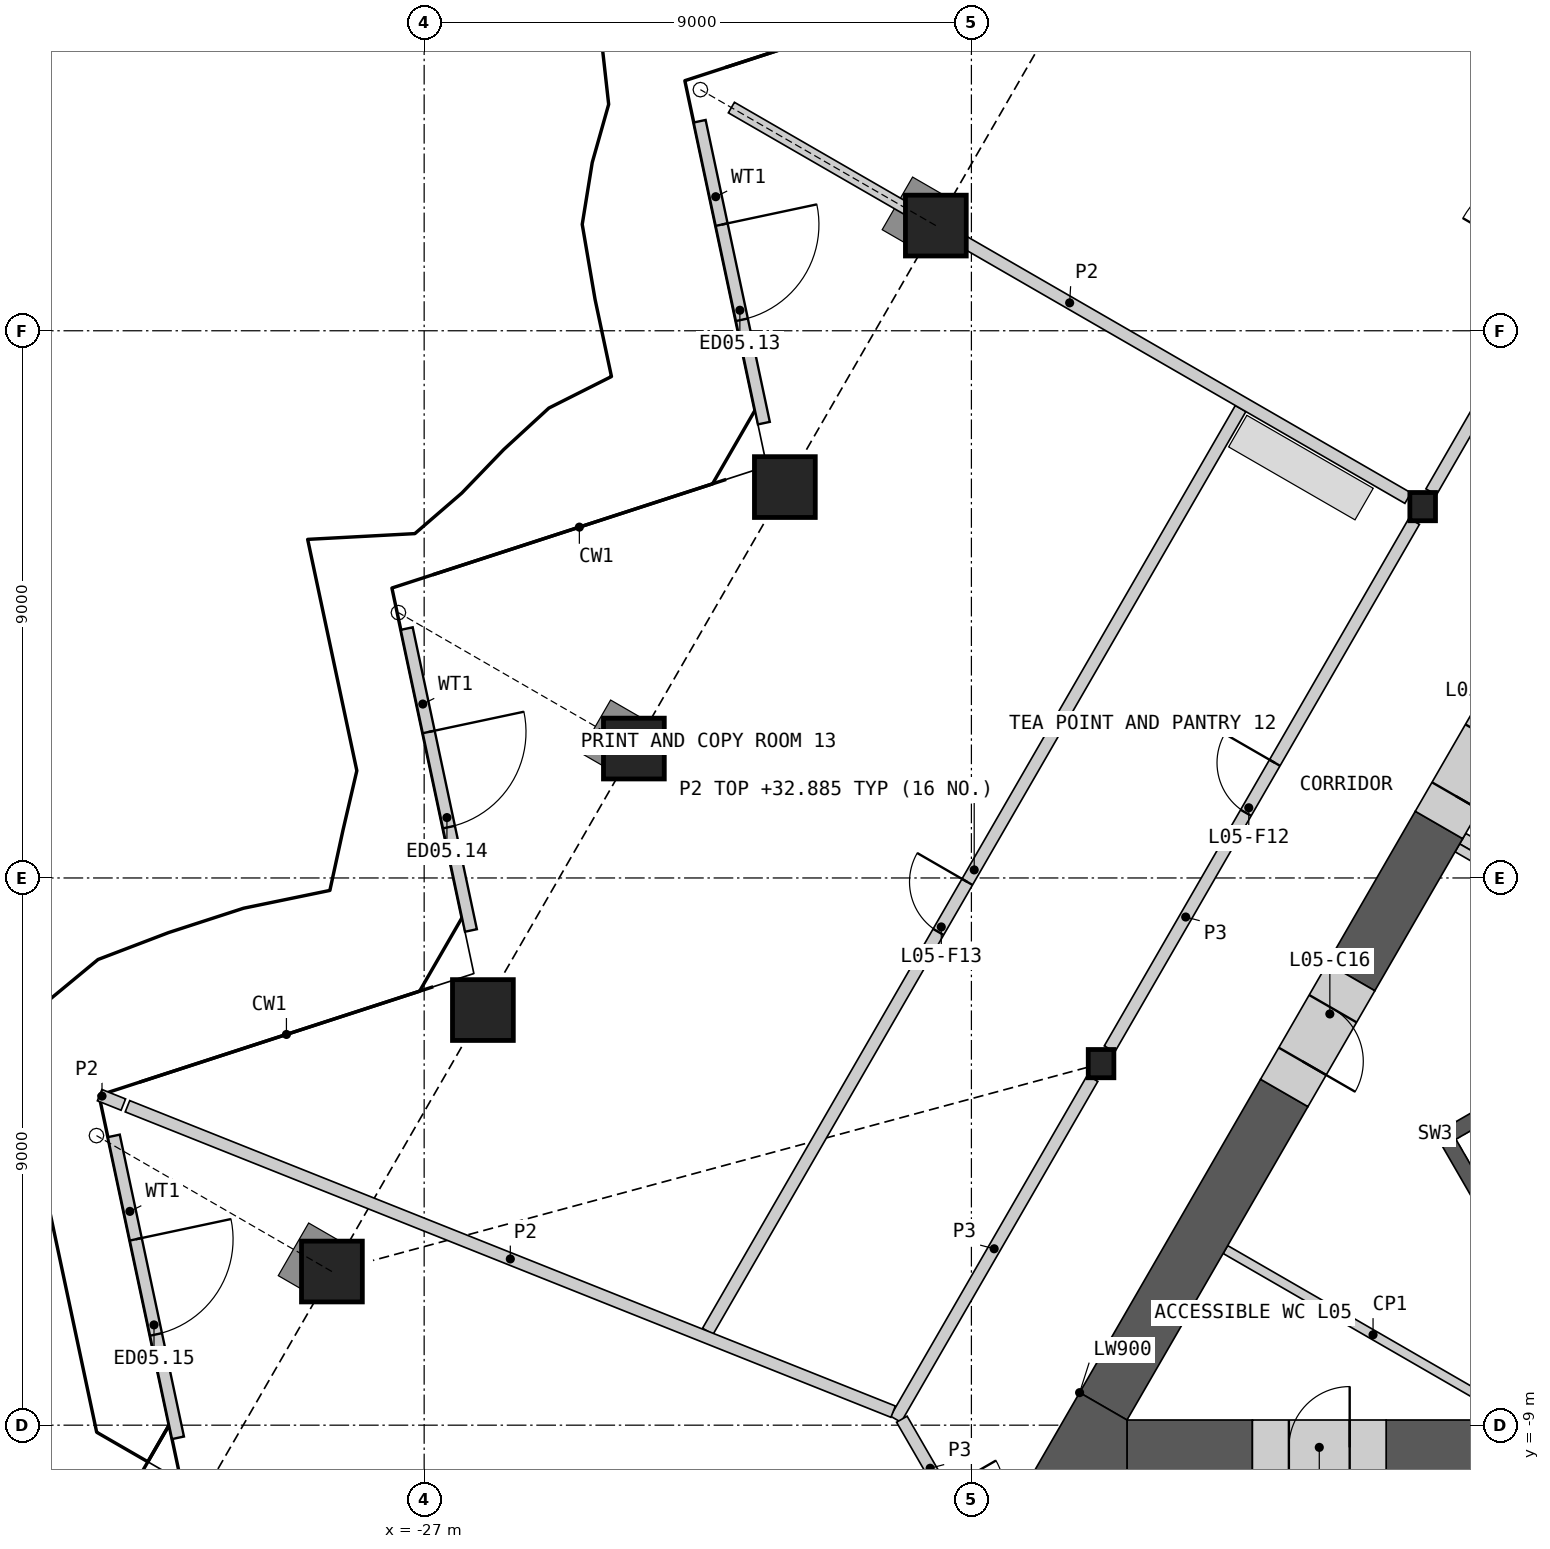
"""IFC4 building model, lengths in metres.
Left out: names, types, materials, properties, quantities, classifications, styles, units other than length and angle.
Written with IfcOpenShell. Run it as: python <this file> out.ifc"""

import sys

from ifc_helpers import new_model, si_unit, direction, frame, frame_2d, origin, origin_2d, place, context, subcontext, project, spatial, polyline, rectangle, hollow_rectangle, i_section, outline, extrude, element, fill, save


model = new_model("IFC4")
c1 = context("Model", 3, precision=1e-05, world=origin(), true_north=direction((0.0, 1.0)))
c2 = subcontext(c1, "Body", "Model", "MODEL_VIEW")
j1 = project(units=[si_unit("LENGTHUNIT", "METRE"), si_unit("PLANEANGLEUNIT", "RADIAN")], contexts=[c1])
p1 = place(None, origin())
s1 = spatial("IfcSite", under=j1, at=p1, CompositionType="ELEMENT")
p2 = place(p1, origin())
s2 = spatial("IfcBuilding", under=s1, at=p2, CompositionType="ELEMENT")
p3 = place(p2, frame((0.0, 0.0, 30.0)))
s3 = spatial("IfcBuildingStorey", under=s2, at=p3, CompositionType="ELEMENT", Elevation=30.0)
p4 = place(p3, frame((-18.585, 10.73, 0.0), z_axis=(-0.631257748816, 0.364419821328, 0.684625334313), x_axis=(-0.499961918033, -0.866047389302, 0.0)))
e1 = element("IfcColumn", 1, at=p4, inside=s3, PredefinedType="COLUMN", context=c2, shape_type="SweptSolid", body=[
    extrude(hollow_rectangle(XDim=1.0, YDim=1.0, WallThickness=0.07, at=origin_2d()), frame((0.0, 0.0, 0.532)), (0.0, 0.0, 1.0), 5.07),
])
p5 = place(p3, frame((-21.068, 6.429, 0.0), z_axis=(0.0, 0.0, 1.0), x_axis=(1.0, 0.0, 0.0)))
e2 = element("IfcColumn", 2, at=p5, inside=s3, PredefinedType="COLUMN", context=c2, shape_type="SweptSolid", body=[
    extrude(hollow_rectangle(XDim=1.0, YDim=1.0, WallThickness=0.07, at=origin_2d()), origin(), (0.0, 0.0, 1.0), 4.2),
])
p6 = place(p3, frame((-23.551, 2.128, 0.0), z_axis=(-0.631248593533, 0.36445433234, 0.684615405028), x_axis=(-0.500002867593, -0.866023748172, 0.0)))
e3 = element("IfcColumn", 3, at=p6, inside=s3, PredefinedType="COLUMN", context=c2, shape_type="SweptSolid", body=[
    extrude(hollow_rectangle(XDim=1.0, YDim=1.0, WallThickness=0.07, at=origin_2d()), frame((0.0, 0.0, 0.532)), (0.0, 0.0, 1.0), 5.07),
])
p7 = place(p3, frame((-26.034, -2.172, 0.0), z_axis=(0.0, 0.0, 1.0), x_axis=(1.0, 0.0, 0.0)))
e4 = element("IfcColumn", 4, at=p7, inside=s3, PredefinedType="COLUMN", context=c2, shape_type="SweptSolid", body=[
    extrude(hollow_rectangle(XDim=1.0, YDim=1.0, WallThickness=0.07, at=origin_2d()), origin(), (0.0, 0.0, 1.0), 4.2),
])
p8 = place(p3, frame((-28.517, -6.473, 0.0), z_axis=(-0.631257748816, 0.364419821328, 0.684625334313), x_axis=(-0.499961918033, -0.866047389302, 0.0)))
e5 = element("IfcColumn", 5, at=p8, inside=s3, PredefinedType="COLUMN", context=c2, shape_type="SweptSolid", body=[
    extrude(hollow_rectangle(XDim=1.0, YDim=1.0, WallThickness=0.07, at=origin_2d()), frame((0.0, 0.0, 0.532)), (0.0, 0.0, 1.0), 5.07),
])
for number, where, z_axis, x_axis in (
    (6, (-10.578, 6.107, 0.0), (0.0, 0.0, 1.0), (1.0, 0.0, 0.0)),
    (7, (-15.868, -3.054, 0.0), (0.0, 0.0, 1.0), (1.0, 0.0, 0.0)),
):
    element("IfcColumn", number, at=place(p3, frame(where, z_axis=z_axis, x_axis=x_axis)), inside=s3, PredefinedType="COLUMN", context=c2, shape_type="SweptSolid", body=[
        extrude(i_section(OverallWidth=0.421, OverallDepth=0.465, WebThickness=0.045, FlangeThickness=0.072, at=origin_2d()), origin(), (0.0, 0.0, 1.0), 4.2),
    ])
p9 = place(p3, frame((-22.469, 12.446, 0.0), z_axis=(0.0, 0.0, 1.0), x_axis=(0.207903044531, -0.978149438519, 0.0)))
e8 = element("IfcWall", 8, at=p9, inside=s3, PredefinedType="SOLIDWALL", context=c2, shape_type="SweptSolid", body=[
    extrude(rectangle(XDim=5.076, YDim=0.2, at=frame_2d((2.538, 0.0))), origin(), (0.0, 0.0, 1.0), 3.189),
])
p10 = place(p9, frame((1.738, 0.0, 0.0)))
e9 = element("IfcOpeningElement", 9, at=p10, cuts=e8, PredefinedType="OPENING", context=c2, shape_type="SweptSolid", body=[
    extrude(rectangle(XDim=1.6, YDim=2.4, at=frame_2d((0.8, 1.2))), frame((0.0, 0.11, 0.0), z_axis=(0.0, -1.0, 0.0), x_axis=(1.0, 0.0, 0.0)), (0.0, 0.0, 1.0), 0.22),
])
p11 = place(p3, frame((-27.286, 4.102, 0.0), z_axis=(0.0, 0.0, 1.0), x_axis=(0.207949057422, -0.978139657471, 0.0)))
e10 = element("IfcWall", 10, at=p11, inside=s3, PredefinedType="SOLIDWALL", context=c2, shape_type="SweptSolid", body=[
    extrude(rectangle(XDim=5.077, YDim=0.2, at=frame_2d((2.538, 0.0))), origin(), (0.0, 0.0, 1.0), 3.189),
])
p12 = place(p11, frame((1.738, 0.0, 0.0)))
e11 = element("IfcOpeningElement", 11, at=p12, cuts=e10, PredefinedType="OPENING", context=c2, shape_type="SweptSolid", body=[
    extrude(rectangle(XDim=1.6, YDim=2.4, at=frame_2d((0.8, 1.2))), frame((0.0, 0.11, 0.0), z_axis=(0.0, -1.0, 0.0), x_axis=(1.0, 0.0, 0.0)), (0.0, 0.0, 1.0), 0.22),
])
p13 = place(p3, frame((-32.104, -4.242, 0.0), z_axis=(0.0, 0.0, 1.0), x_axis=(0.207903044531, -0.978149438519, 0.0)))
e12 = element("IfcWall", 12, at=p13, inside=s3, PredefinedType="SOLIDWALL", context=c2, shape_type="SweptSolid", body=[
    extrude(rectangle(XDim=5.076, YDim=0.2, at=frame_2d((2.538, 0.0))), origin(), (0.0, 0.0, 1.0), 3.189),
])
p14 = place(p13, frame((1.738, 0.0, 0.0)))
e13 = element("IfcOpeningElement", 13, at=p14, cuts=e12, PredefinedType="OPENING", context=c2, shape_type="SweptSolid", body=[
    extrude(rectangle(XDim=1.6, YDim=2.4, at=frame_2d((0.8, 1.2))), frame((0.0, 0.11, 0.0), z_axis=(0.0, -1.0, 0.0), x_axis=(1.0, 0.0, 0.0)), (0.0, 0.0, 1.0), 0.22),
])
p15 = place(p3, frame((-8.181, -0.357, 0.0), z_axis=(0.0, 0.0, 1.0), x_axis=(-0.866035824272, 0.499981950752, 0.0)))
e14 = element("IfcWall", 14, at=p15, inside=s3, PredefinedType="SHEAR", context=c2, shape_type="SweptSolid", body=[
    extrude(rectangle(XDim=2.009, YDim=0.2, at=frame_2d((1.004, 0.0))), origin(), (0.0, 0.0, 1.0), 3.8),
])
p16 = place(p3, origin())
e15 = element("IfcWall", 15, at=p16, inside=s3, PredefinedType="SHEAR", context=c2, shape_type="SweptSolid", body=[
    extrude(outline(polyline([(-5.307, -1.281), (-10.374, -4.206), (-10.032, -4.298), (-5.182, -1.498), (-5.307, -1.281)])), origin(), (0.0, 0.0, 1.0), 3.8),
])
p17 = place(p3, origin())
e16 = element("IfcWall", 16, at=p17, inside=s3, PredefinedType="SHEAR", context=c2, shape_type="SweptSolid", body=[
    extrude(outline(polyline([(-10.374, -4.206), (-8.83, -6.881), (-8.738, -6.539), (-10.032, -4.298), (-10.374, -4.206)])), origin(), (0.0, 0.0, 1.0), 3.8),
])
p18 = place(p3, frame((-8.268, -0.509, 0.0), z_axis=(0.0, 0.0, 1.0), x_axis=(-0.866035824272, 0.499981950752, 0.0)))
e17 = element("IfcWall", 17, at=p18, inside=s3, PredefinedType="PARTITIONING", context=c2, shape_type="SweptSolid", body=[
    extrude(rectangle(XDim=2.009, YDim=0.15, at=frame_2d((1.004, 0.0))), origin(), (0.0, 0.0, 1.0), 3.8),
])
p19 = place(p3, frame((-13.823, -6.111, 0.0), z_axis=(0.0, 0.0, 1.0), x_axis=(0.866026802741, -0.499997576928, 0.0)))
e18 = element("IfcWall", 18, at=p19, inside=s3, PredefinedType="PARTITIONING", context=c2, shape_type="SweptSolid", body=[
    extrude(rectangle(XDim=5.607, YDim=0.15, at=frame_2d((2.804, 0.0))), origin(), (0.0, 0.0, 1.0), 3.8),
])
p20 = place(p3, frame((-11.179, -9.365, 0.0), z_axis=(0.0, 0.0, 1.0), x_axis=(1.0, 0.0, 0.0)))
e19 = element("IfcWall", 19, at=p20, inside=s3, PredefinedType="SHEAR", context=c2, shape_type="SweptSolid", body=[
    extrude(rectangle(XDim=15.55, YDim=0.9, at=frame_2d((7.775, 0.0))), origin(), (0.0, 0.0, 1.0), 3.8),
])
p21 = place(p3, frame((-15.441, -9.365, 0.0), z_axis=(0.0, 0.0, 1.0), x_axis=(1.0, 0.0, 0.0)))
e20 = element("IfcWall", 20, at=p21, inside=s3, PredefinedType="SHEAR", context=c2, shape_type="SweptSolid", body=[
    extrude(rectangle(XDim=2.062, YDim=0.9, at=frame_2d((1.031, 0.0))), origin(), (0.0, 0.0, 1.0), 3.8),
])
p22 = place(p3, frame((-12.855, -3.536, 0.0), z_axis=(0.0, 0.0, 1.0), x_axis=(-0.499999419053, -0.866025739194, 0.0)))
e21 = element("IfcWall", 21, at=p22, inside=s3, PredefinedType="SHEAR", context=c2, shape_type="SweptSolid", body=[
    extrude(rectangle(XDim=5.952, YDim=0.9, at=frame_2d((2.976, 0.0))), origin(), (0.0, 0.0, 1.0), 3.8),
])
p23 = place(p3, frame((-10.31, 0.872, 0.0), z_axis=(0.0, 0.0, 1.0), x_axis=(-0.499946751862, -0.866056144429, 0.0)))
e22 = element("IfcWall", 22, at=p23, inside=s3, PredefinedType="SHEAR", context=c2, shape_type="SweptSolid", body=[
    extrude(rectangle(XDim=2.889, YDim=0.9, at=frame_2d((1.445, 0.0))), origin(), (0.0, 0.0, 1.0), 3.8),
])
p24 = place(p3, origin())
e23 = element("IfcWall", 23, at=p24, inside=s3, PredefinedType="SHEAR", context=c2, shape_type="SweptSolid", body=[
    extrude(outline(polyline([(-16.221, -8.465), (-15.441, -8.915), (-15.441, -9.815), (-17.0, -9.815), (-16.221, -8.465)])), origin(), (0.0, 0.0, 1.0), 3.8),
])
p25 = place(p3, frame((-13.379, -9.365, 0.0), z_axis=(0.0, 0.0, 1.0), x_axis=(1.0, 0.0, 0.0)))
e24 = element("IfcWall", 24, at=p25, inside=s3, PredefinedType="SHEAR", context=c2, shape_type="SweptSolid", body=[
    extrude(rectangle(XDim=2.2, YDim=0.9, at=frame_2d((1.1, 0.0))), origin(), (0.0, 0.0, 1.0), 3.8),
])
p26 = place(p25, frame((0.6, 0.0, 0.0)))
e25 = element("IfcOpeningElement", 25, at=p26, cuts=e24, PredefinedType="OPENING", context=c2, shape_type="SweptSolid", body=[
    extrude(rectangle(XDim=1.0, YDim=2.1, at=frame_2d((0.5, 1.05))), frame((0.0, 0.46, 0.0), z_axis=(0.0, -1.0, 0.0), x_axis=(1.0, 0.0, 0.0)), (0.0, 0.0, 1.0), 0.92),
])
p27 = place(p3, frame((-11.755, -1.63, 0.0), z_axis=(0.0, 0.0, 1.0), x_axis=(-0.50002983664, -0.866008176907, 0.0)))
e26 = element("IfcWall", 26, at=p27, inside=s3, PredefinedType="SHEAR", context=c2, shape_type="SweptSolid", body=[
    extrude(rectangle(XDim=2.2, YDim=0.9, at=frame_2d((1.1, 0.0))), origin(), (0.0, 0.0, 1.0), 3.8),
])
p28 = place(p27, frame((0.6, 0.0, 0.0)))
e27 = element("IfcOpeningElement", 27, at=p28, cuts=e26, PredefinedType="OPENING", context=c2, shape_type="SweptSolid", body=[
    extrude(rectangle(XDim=1.0, YDim=2.1, at=frame_2d((0.5, 1.05))), frame((0.0, 0.46, 0.0), z_axis=(0.0, -1.0, 0.0), x_axis=(1.0, 0.0, 0.0)), (0.0, 0.0, 1.0), 0.92),
])
p29 = place(p3, frame((-9.21, 2.777, 0.0), z_axis=(0.0, 0.0, 1.0), x_axis=(-0.500077893725, -0.86598042715, 0.0)))
e28 = element("IfcWall", 28, at=p29, inside=s3, PredefinedType="SHEAR", context=c2, shape_type="SweptSolid", body=[
    extrude(rectangle(XDim=2.2, YDim=0.9, at=frame_2d((1.1, 0.0))), origin(), (0.0, 0.0, 1.0), 3.8),
])
p30 = place(p29, frame((0.55, 0.0, 0.0)))
e29 = element("IfcOpeningElement", 29, at=p30, cuts=e28, PredefinedType="OPENING", context=c2, shape_type="SweptSolid", body=[
    extrude(rectangle(XDim=1.1, YDim=2.1, at=frame_2d((0.55, 1.05))), frame((0.0, 0.46, 0.0), z_axis=(0.0, -1.0, 0.0), x_axis=(1.0, 0.0, 0.0)), (0.0, 0.0, 1.0), 0.92),
])
p31 = place(p3, frame((-10.439, 6.35, 0.0), z_axis=(0.0, 0.0, 1.0), x_axis=(0.50001002959, 0.86601961312, 0.0)))
e30 = element("IfcWall", 30, at=p31, inside=s3, PredefinedType="PARTITIONING", context=c2, shape_type="SweptSolid", body=[
    extrude(rectangle(XDim=10.019, YDim=0.2, at=frame_2d((5.009, 0.0))), origin(), (0.0, 0.0, 1.0), 3.8),
])
p32 = place(p31, frame((4.16, 0.0, 0.0)))
e31 = element("IfcOpeningElement", 31, at=p32, cuts=e30, PredefinedType="OPENING", context=c2, shape_type="SweptSolid", body=[
    extrude(rectangle(XDim=1.8, YDim=2.1, at=frame_2d((0.9, 1.05))), frame((0.0, 0.11, 0.0), z_axis=(0.0, -1.0, 0.0), x_axis=(1.0, 0.0, 0.0)), (0.0, 0.0, 1.0), 0.22),
])
p33 = place(p3, frame((-15.728, -2.811, 0.0), z_axis=(0.0, 0.0, 1.0), x_axis=(0.49999175339, 0.866030164915, 0.0)))
e32 = element("IfcWall", 32, at=p33, inside=s3, PredefinedType="PARTITIONING", context=c2, shape_type="SweptSolid", body=[
    extrude(rectangle(XDim=10.019, YDim=0.2, at=frame_2d((5.009, 0.0))), origin(), (0.0, 0.0, 1.0), 3.8),
])
p34 = place(p33, frame((4.484, 0.0, 0.0)))
e33 = element("IfcOpeningElement", 33, at=p34, cuts=e32, PredefinedType="OPENING", context=c2, shape_type="SweptSolid", body=[
    extrude(rectangle(XDim=0.95, YDim=2.1, at=frame_2d((0.475, 1.05))), frame((0.0, 0.11, 0.0), z_axis=(0.0, -1.0, 0.0), x_axis=(1.0, 0.0, 0.0)), (0.0, 0.0, 1.0), 0.22),
])
p35 = place(p3, frame((-19.244, -8.902, 0.0), z_axis=(0.0, 0.0, 1.0), x_axis=(0.499984737558, 0.86603421538, 0.0)))
e34 = element("IfcWall", 34, at=p35, inside=s3, PredefinedType="PARTITIONING", context=c2, shape_type="SweptSolid", body=[
    extrude(rectangle(XDim=6.473, YDim=0.2, at=frame_2d((3.236, 0.0))), origin(), (0.0, 0.0, 1.0), 3.8),
])
p36 = place(p3, frame((-19.144, -8.902, 0.0), z_axis=(0.0, 0.0, 1.0), x_axis=(0.499958791762, -0.866049194065, 0.0)))
e35 = element("IfcWall", 35, at=p36, inside=s3, PredefinedType="PARTITIONING", context=c2, shape_type="SweptSolid", body=[
    extrude(rectangle(XDim=3.726, YDim=0.2, at=frame_2d((1.863, 0.0))), origin(), (0.0, 0.0, 1.0), 3.8),
])
p37 = place(p36, frame((1.363, 0.0, 0.0)))
e36 = element("IfcOpeningElement", 36, at=p37, cuts=e35, PredefinedType="OPENING", context=c2, shape_type="SweptSolid", body=[
    extrude(rectangle(XDim=1.0, YDim=2.1, at=frame_2d((0.5, 1.05))), frame((0.0, 0.11, 0.0), z_axis=(0.0, -1.0, 0.0), x_axis=(1.0, 0.0, 0.0)), (0.0, 0.0, 1.0), 0.22),
])
p38 = place(p3, frame((-22.335, -7.455, 0.0), z_axis=(0.0, 0.0, 1.0), x_axis=(0.499997414609, 0.866026896456, 0.0)))
e37 = element("IfcWall", 37, at=p38, inside=s3, PredefinedType="PARTITIONING", context=c2, shape_type="SweptSolid", body=[
    extrude(rectangle(XDim=17.524, YDim=0.2, at=frame_2d((8.762, 0.0))), origin(), (0.0, 0.0, 1.0), 2.885),
])
p39 = place(p38, frame((7.584, 0.0, 0.0)))
e38 = element("IfcOpeningElement", 38, at=p39, cuts=e37, PredefinedType="OPENING", context=c2, shape_type="SweptSolid", body=[
    extrude(rectangle(XDim=0.95, YDim=2.1, at=frame_2d((0.475, 1.05))), frame((0.0, 0.11, 0.0), z_axis=(0.0, -1.0, 0.0), x_axis=(1.0, 0.0, 0.0)), (0.0, 0.0, 1.0), 0.22),
])
p40 = place(p3, frame((-31.879, -3.754, 0.0), z_axis=(0.0, 0.0, 1.0), x_axis=(0.928821541656, -0.370527385973, 0.0)))
e39 = element("IfcWall", 39, at=p40, inside=s3, PredefinedType="PARTITIONING", context=c2, shape_type="SweptSolid", body=[
    extrude(rectangle(XDim=13.558, YDim=0.2, at=frame_2d((6.779, 0.0))), origin(), (0.0, 0.0, 1.0), 2.885),
])
p41 = place(p3, frame((-21.947, 12.671, 0.0), z_axis=(0.0, 0.0, 1.0), x_axis=(0.866026729935, -0.499997703033, 0.0)))
e40 = element("IfcWall", 40, at=p41, inside=s3, PredefinedType="PARTITIONING", context=c2, shape_type="SweptSolid", body=[
    extrude(rectangle(XDim=12.848, YDim=0.2, at=frame_2d((6.424, 0.0))), origin(), (0.0, 0.0, 1.0), 2.885),
])
p42 = place(p3, frame((-32.337, -3.572, 0.0), z_axis=(0.0, 0.0, 1.0), x_axis=(0.928757356094, -0.370688243003, 0.0)))
e41 = element("IfcWall", 41, at=p42, inside=s3, PredefinedType="PARTITIONING", context=c2, shape_type="SweptSolid", body=[
    extrude(rectangle(XDim=0.419, YDim=0.2, at=frame_2d((0.21, 0.0))), origin(), (0.0, 0.0, 1.0), 2.885),
])
p43 = place(p10, origin())
e42 = element("IfcDoor", 42, at=p43, inside=s3, OperationType="DOUBLE_DOOR_SINGLE_SWING", PredefinedType="DOOR", context=c2, shape_type="SweptSolid", body=[
    extrude(rectangle(XDim=1.6, YDim=2.4, at=frame_2d((0.8, 1.2))), frame((0.0, 0.025, 0.0), z_axis=(0.0, -1.0, 0.0), x_axis=(1.0, 0.0, 0.0)), (0.0, 0.0, 1.0), 0.05),
])
fill(e9, e42)
p44 = place(p12, origin())
e43 = element("IfcDoor", 43, at=p44, inside=s3, OperationType="DOUBLE_DOOR_SINGLE_SWING", PredefinedType="DOOR", context=c2, shape_type="SweptSolid", body=[
    extrude(rectangle(XDim=1.6, YDim=2.4, at=frame_2d((0.8, 1.2))), frame((0.0, 0.025, 0.0), z_axis=(0.0, -1.0, 0.0), x_axis=(1.0, 0.0, 0.0)), (0.0, 0.0, 1.0), 0.05),
])
fill(e11, e43)
p45 = place(p14, origin())
e44 = element("IfcDoor", 44, at=p45, inside=s3, OperationType="DOUBLE_DOOR_SINGLE_SWING", PredefinedType="DOOR", context=c2, shape_type="SweptSolid", body=[
    extrude(rectangle(XDim=1.6, YDim=2.4, at=frame_2d((0.8, 1.2))), frame((0.0, 0.025, 0.0), z_axis=(0.0, -1.0, 0.0), x_axis=(1.0, 0.0, 0.0)), (0.0, 0.0, 1.0), 0.05),
])
fill(e13, e44)
p46 = place(p26, origin())
e45 = element("IfcDoor", 45, at=p46, inside=s3, OperationType="SINGLE_SWING_RIGHT", PredefinedType="DOOR", context=c2, shape_type="SweptSolid", body=[
    extrude(rectangle(XDim=1.0, YDim=2.1, at=frame_2d((0.5, 1.05))), frame((0.0, 0.205, 0.0), z_axis=(0.0, -1.0, 0.0), x_axis=(1.0, 0.0, 0.0)), (0.0, 0.0, 1.0), 0.05),
])
fill(e25, e45)
p47 = place(p28, origin())
e46 = element("IfcDoor", 46, at=p47, inside=s3, OperationType="SINGLE_SWING_RIGHT", PredefinedType="DOOR", context=c2, shape_type="SweptSolid", body=[
    extrude(rectangle(XDim=1.0, YDim=2.1, at=frame_2d((0.5, 1.05))), frame((0.0, 0.205, 0.0), z_axis=(0.0, -1.0, 0.0), x_axis=(1.0, 0.0, 0.0)), (0.0, 0.0, 1.0), 0.05),
])
fill(e27, e46)
p48 = place(p30, origin())
e47 = element("IfcDoor", 47, at=p48, inside=s3, OperationType="SINGLE_SWING_RIGHT", PredefinedType="DOOR", context=c2, shape_type="SweptSolid", body=[
    extrude(rectangle(XDim=1.1, YDim=2.1, at=frame_2d((0.55, 1.05))), frame((0.0, 0.205, 0.0), z_axis=(0.0, -1.0, 0.0), x_axis=(1.0, 0.0, 0.0)), (0.0, 0.0, 1.0), 0.05),
])
fill(e29, e47)
p49 = place(p34, origin())
e48 = element("IfcDoor", 48, at=p49, inside=s3, OperationType="SINGLE_SWING_RIGHT", PredefinedType="DOOR", context=c2, shape_type="SweptSolid", body=[
    extrude(rectangle(XDim=0.95, YDim=2.1, at=frame_2d((0.475, 1.05))), frame((0.0, 0.025, 0.0), z_axis=(0.0, -1.0, 0.0), x_axis=(1.0, 0.0, 0.0)), (0.0, 0.0, 1.0), 0.05),
])
fill(e33, e48)
p50 = place(p39, origin())
e49 = element("IfcDoor", 49, at=p50, inside=s3, OperationType="SINGLE_SWING_RIGHT", PredefinedType="DOOR", context=c2, shape_type="SweptSolid", body=[
    extrude(rectangle(XDim=0.95, YDim=2.1, at=frame_2d((0.475, 1.05))), frame((0.0, 0.025, 0.0), z_axis=(0.0, -1.0, 0.0), x_axis=(1.0, 0.0, 0.0)), (0.0, 0.0, 1.0), 0.05),
])
fill(e38, e49)
save(model, sys.argv[1])
